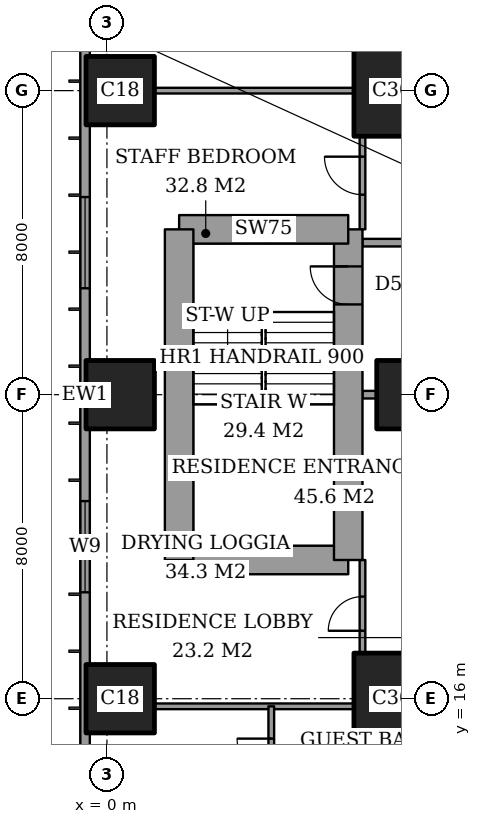
"""IFC4 building model, lengths in metres.
Left out: names, types, materials, properties, quantities, classifications, styles, units other than length and angle.
Written with IfcOpenShell. Run it as: python <this file> out.ifc"""

import sys

from ifc_helpers import new_model, si_unit, direction, frame, frame_2d, origin, origin_2d, place, context, subcontext, project, spatial, rectangle, extrude, element, fill, save


model = new_model("IFC4")
c1 = context("Model", 3, precision=1e-05, world=origin(), true_north=direction((0.0, 1.0)))
c2 = subcontext(c1, "Body", "Model", "MODEL_VIEW")
j1 = project(units=[si_unit("LENGTHUNIT", "METRE"), si_unit("PLANEANGLEUNIT", "RADIAN")], contexts=[c1])
p1 = place(None, origin())
s1 = spatial("IfcSite", under=j1, at=p1, CompositionType="ELEMENT")
p2 = place(p1, origin())
s2 = spatial("IfcBuilding", under=s1, at=p2, CompositionType="ELEMENT")
p3 = place(p2, frame((0.0, 0.0, 189.4)))
s3 = spatial("IfcBuildingStorey", under=s2, at=p3, CompositionType="ELEMENT", Elevation=189.4)
for number, where, z_axis, x_axis in (
    (1, (0.35, 16.0, 0.0), (0.0, 0.0, 1.0), (1.0, 0.0, 0.0)),
    (2, (0.35, 24.0, 0.0), (0.0, 0.0, 1.0), (1.0, 0.0, 0.0)),
    (3, (0.35, 32.0, 0.0), (0.0, 0.0, 1.0), (1.0, 0.0, 0.0)),
):
    element("IfcColumn", number, at=place(p3, frame(where, z_axis=z_axis, x_axis=x_axis)), inside=s3, PredefinedType="COLUMN", context=c2, shape_type="SweptSolid", body=[
        extrude(rectangle(XDim=1.8, YDim=1.8, at=origin_2d()), origin(), (0.0, 0.0, 1.0), 3.6),
    ])
p4 = place(p3, frame((8.0, 16.0, 0.0), z_axis=(0.0, 0.0, 1.0), x_axis=(1.0, 0.0, 0.0)))
e4 = element("IfcColumn", 4, at=p4, inside=s3, PredefinedType="COLUMN", context=c2, shape_type="SweptSolid", body=[
    extrude(rectangle(XDim=3.0, YDim=2.4, at=origin_2d()), origin(), (0.0, 0.0, 1.0), 3.6),
])
p5 = place(p3, frame((8.0, 24.0, 0.0), z_axis=(0.0, 0.0, 1.0), x_axis=(1.0, 0.0, 0.0)))
e5 = element("IfcColumn", 5, at=p5, inside=s3, PredefinedType="COLUMN", context=c2, shape_type="SweptSolid", body=[
    extrude(rectangle(XDim=1.8, YDim=1.8, at=origin_2d()), origin(), (0.0, 0.0, 1.0), 3.6),
])
p6 = place(p3, frame((8.0, 32.0, 0.0), z_axis=(0.0, 0.0, 1.0), x_axis=(1.0, 0.0, 0.0)))
e6 = element("IfcColumn", 6, at=p6, inside=s3, PredefinedType="COLUMN", context=c2, shape_type="SweptSolid", body=[
    extrude(rectangle(XDim=3.0, YDim=2.4, at=origin_2d()), origin(), (0.0, 0.0, 1.0), 3.6),
])
p7 = place(p3, frame((1.9, 19.65, 0.0), z_axis=(0.0, 0.0, 1.0), x_axis=(1.0, 0.0, 0.0)))
e7 = element("IfcWall", 7, at=p7, inside=s3, PredefinedType="SHEAR", context=c2, shape_type="SweptSolid", body=[
    extrude(rectangle(XDim=4.45, YDim=0.75, at=frame_2d((2.225, 0.0))), origin(), (0.0, 0.0, 1.0), 3.6),
])
p8 = place(p3, frame((6.35, 19.65, 0.0), z_axis=(0.0, 0.0, 1.0), x_axis=(0.0, 1.0, 0.0)))
e8 = element("IfcWall", 8, at=p8, inside=s3, PredefinedType="SHEAR", context=c2, shape_type="SweptSolid", body=[
    extrude(rectangle(XDim=8.7, YDim=0.75, at=frame_2d((4.35, 0.0))), origin(), (0.0, 0.0, 1.0), 3.6),
])
p9 = place(p8, frame((6.725, 0.0, 0.0)))
e9 = element("IfcOpeningElement", 9, at=p9, cuts=e8, PredefinedType="OPENING", context=c2, shape_type="SweptSolid", body=[
    extrude(rectangle(XDim=1.0, YDim=2.1, at=frame_2d((0.5, 1.05))), frame((0.0, 0.385, 0.0), z_axis=(0.0, -1.0, 0.0), x_axis=(1.0, 0.0, 0.0)), (0.0, 0.0, 1.0), 0.77),
])
p10 = place(p3, frame((6.35, 28.35, 0.0), z_axis=(0.0, 0.0, 1.0), x_axis=(-1.0, 0.0, 0.0)))
e10 = element("IfcWall", 10, at=p10, inside=s3, PredefinedType="SHEAR", context=c2, shape_type="SweptSolid", body=[
    extrude(rectangle(XDim=4.45, YDim=0.75, at=frame_2d((2.225, 0.0))), origin(), (0.0, 0.0, 1.0), 3.6),
])
p11 = place(p3, frame((1.9, 28.35, 0.0), z_axis=(0.0, 0.0, 1.0), x_axis=(0.0, -1.0, 0.0)))
e11 = element("IfcWall", 11, at=p11, inside=s3, PredefinedType="SHEAR", context=c2, shape_type="SweptSolid", body=[
    extrude(rectangle(XDim=8.7, YDim=0.75, at=frame_2d((4.35, 0.0))), origin(), (0.0, 0.0, 1.0), 3.6),
])
p12 = place(p3, frame((-0.575, 44.825, 0.0), z_axis=(0.0, 0.0, 1.0), x_axis=(0.0, -1.0, 0.0)))
e12 = element("IfcWall", 12, at=p12, inside=s3, PredefinedType="SOLIDWALL", context=c2, shape_type="SweptSolid", body=[
    extrude(rectangle(XDim=41.65, YDim=0.25, at=frame_2d((20.825, 0.0))), origin(), (0.0, 0.0, 1.0), 3.6),
])
p13 = place(p12, frame((0.825, 0.0, 0.2)))
e13 = element("IfcOpeningElement", 13, at=p13, cuts=e12, PredefinedType="OPENING", context=c2, shape_type="SweptSolid", body=[
    extrude(rectangle(XDim=2.4, YDim=2.4, at=frame_2d((1.2, 1.2))), frame((0.0, 0.135, 0.0), z_axis=(0.0, -1.0, 0.0), x_axis=(1.0, 0.0, 0.0)), (0.0, 0.0, 1.0), 0.27),
])
p14 = place(p12, frame((6.05, 0.0, 0.2)))
e14 = element("IfcOpeningElement", 14, at=p14, cuts=e12, PredefinedType="OPENING", context=c2, shape_type="SweptSolid", body=[
    extrude(rectangle(XDim=1.2, YDim=2.4, at=frame_2d((0.6, 1.2))), frame((0.0, 0.135, 0.0), z_axis=(0.0, -1.0, 0.0), x_axis=(1.0, 0.0, 0.0)), (0.0, 0.0, 1.0), 0.27),
])
p15 = place(p12, frame((8.475, 0.0, 0.2)))
e15 = element("IfcOpeningElement", 15, at=p15, cuts=e12, PredefinedType="OPENING", context=c2, shape_type="SweptSolid", body=[
    extrude(rectangle(XDim=2.4, YDim=2.4, at=frame_2d((1.2, 1.2))), frame((0.0, 0.135, 0.0), z_axis=(0.0, -1.0, 0.0), x_axis=(1.0, 0.0, 0.0)), (0.0, 0.0, 1.0), 0.27),
])
p16 = place(p12, frame((15.625, 0.0, 0.2)))
e16 = element("IfcOpeningElement", 16, at=p16, cuts=e12, PredefinedType="OPENING", context=c2, shape_type="SweptSolid", body=[
    extrude(rectangle(XDim=2.4, YDim=2.4, at=frame_2d((1.2, 1.2))), frame((0.0, 0.135, 0.0), z_axis=(0.0, -1.0, 0.0), x_axis=(1.0, 0.0, 0.0)), (0.0, 0.0, 1.0), 0.27),
])
p17 = place(p12, frame((23.625, 0.0, 0.2)))
e17 = element("IfcOpeningElement", 17, at=p17, cuts=e12, PredefinedType="OPENING", context=c2, shape_type="SweptSolid", body=[
    extrude(rectangle(XDim=2.4, YDim=2.4, at=frame_2d((1.2, 1.2))), frame((0.0, 0.135, 0.0), z_axis=(0.0, -1.0, 0.0), x_axis=(1.0, 0.0, 0.0)), (0.0, 0.0, 1.0), 0.27),
])
p18 = place(p12, frame((30.775, 0.0, 0.2)))
e18 = element("IfcOpeningElement", 18, at=p18, cuts=e12, PredefinedType="OPENING", context=c2, shape_type="SweptSolid", body=[
    extrude(rectangle(XDim=2.4, YDim=2.4, at=frame_2d((1.2, 1.2))), frame((0.0, 0.135, 0.0), z_axis=(0.0, -1.0, 0.0), x_axis=(1.0, 0.0, 0.0)), (0.0, 0.0, 1.0), 0.27),
])
p19 = place(p12, frame((34.55, 0.0, 0.2)))
e19 = element("IfcOpeningElement", 19, at=p19, cuts=e12, PredefinedType="OPENING", context=c2, shape_type="SweptSolid", body=[
    extrude(rectangle(XDim=1.2, YDim=2.4, at=frame_2d((0.6, 1.2))), frame((0.0, 0.135, 0.0), z_axis=(0.0, -1.0, 0.0), x_axis=(1.0, 0.0, 0.0)), (0.0, 0.0, 1.0), 0.27),
])
p20 = place(p12, frame((38.425, 0.0, 0.2)))
e20 = element("IfcOpeningElement", 20, at=p20, cuts=e12, PredefinedType="OPENING", context=c2, shape_type="SweptSolid", body=[
    extrude(rectangle(XDim=2.4, YDim=2.4, at=frame_2d((1.2, 1.2))), frame((0.0, 0.135, 0.0), z_axis=(0.0, -1.0, 0.0), x_axis=(1.0, 0.0, 0.0)), (0.0, 0.0, 1.0), 0.27),
])
p21 = place(p3, frame((1.25, 15.8, 0.0), z_axis=(0.0, 0.0, 1.0), x_axis=(1.0, 0.0, 0.0)))
e21 = element("IfcWall", 21, at=p21, inside=s3, PredefinedType="PARTITIONING", context=c2, shape_type="SweptSolid", body=[
    extrude(rectangle(XDim=5.25, YDim=0.15, at=frame_2d((2.625, 0.0))), origin(), (0.0, 0.0, 1.0), 3.35),
])
p22 = place(p3, frame((6.725, 24.0, 0.0), z_axis=(0.0, 0.0, 1.0), x_axis=(1.0, 0.0, 0.0)))
e22 = element("IfcWall", 22, at=p22, inside=s3, PredefinedType="PARTITIONING", context=c2, shape_type="SweptSolid", body=[
    extrude(rectangle(XDim=0.375, YDim=0.2, at=frame_2d((0.188, 0.0))), origin(), (0.0, 0.0, 1.0), 3.35),
])
p23 = place(p3, frame((6.725, 28.0, 0.0), z_axis=(0.0, 0.0, 1.0), x_axis=(1.0, 0.0, 0.0)))
e23 = element("IfcWall", 23, at=p23, inside=s3, PredefinedType="PARTITIONING", context=c2, shape_type="SweptSolid", body=[
    extrude(rectangle(XDim=17.275, YDim=0.2, at=frame_2d((8.637, 0.0))), origin(), (0.0, 0.0, 1.0), 3.35),
])
p24 = place(p23, frame((6.675, 0.0, 0.0)))
e24 = element("IfcOpeningElement", 24, at=p24, cuts=e23, PredefinedType="OPENING", context=c2, shape_type="SweptSolid", body=[
    extrude(rectangle(XDim=1.2, YDim=2.4, at=frame_2d((0.6, 1.2))), frame((0.0, 0.11, 0.0), z_axis=(0.0, -1.0, 0.0), x_axis=(1.0, 0.0, 0.0)), (0.0, 0.0, 1.0), 0.22),
])
p25 = place(p3, frame((1.25, 32.0, 0.0), z_axis=(0.0, 0.0, 1.0), x_axis=(1.0, 0.0, 0.0)))
e25 = element("IfcWall", 25, at=p25, inside=s3, PredefinedType="PARTITIONING", context=c2, shape_type="SweptSolid", body=[
    extrude(rectangle(XDim=5.25, YDim=0.15, at=frame_2d((2.625, 0.0))), origin(), (0.0, 0.0, 1.0), 2.634),
])
p26 = place(p3, frame((4.325, 13.2, 0.0), z_axis=(0.0, 0.0, 1.0), x_axis=(0.0, 1.0, 0.0)))
e26 = element("IfcWall", 26, at=p26, inside=s3, PredefinedType="PARTITIONING", context=c2, shape_type="SweptSolid", body=[
    extrude(rectangle(XDim=2.6, YDim=0.15, at=frame_2d((1.3, 0.0))), origin(), (0.0, 0.0, 1.0), 3.35),
])
p27 = place(p26, frame((0.85, 0.0, 0.0)))
e27 = element("IfcOpeningElement", 27, at=p27, cuts=e26, PredefinedType="OPENING", context=c2, shape_type="SweptSolid", body=[
    extrude(rectangle(XDim=0.9, YDim=2.1, at=frame_2d((0.45, 1.05))), frame((0.0, 0.085, 0.0), z_axis=(0.0, -1.0, 0.0), x_axis=(1.0, 0.0, 0.0)), (0.0, 0.0, 1.0), 0.17),
])
p28 = place(p3, frame((6.725, 10.6, 0.0), z_axis=(0.0, 0.0, 1.0), x_axis=(0.0, 1.0, 0.0)))
e28 = element("IfcWall", 28, at=p28, inside=s3, PredefinedType="PARTITIONING", context=c2, shape_type="SweptSolid", body=[
    extrude(rectangle(XDim=4.2, YDim=0.15, at=frame_2d((2.1, 0.0))), origin(), (0.0, 0.0, 1.0), 3.35),
])
p29 = place(p3, frame((6.725, 17.2, 0.0), z_axis=(0.0, 0.0, 1.0), x_axis=(0.0, 1.0, 0.0)))
e29 = element("IfcWall", 29, at=p29, inside=s3, PredefinedType="PARTITIONING", context=c2, shape_type="SweptSolid", body=[
    extrude(rectangle(XDim=2.45, YDim=0.15, at=frame_2d((1.225, 0.0))), origin(), (0.0, 0.0, 1.0), 3.35),
])
p30 = place(p29, frame((0.587, 0.0, 0.0)))
e30 = element("IfcOpeningElement", 30, at=p30, cuts=e29, PredefinedType="OPENING", context=c2, shape_type="SweptSolid", body=[
    extrude(rectangle(XDim=0.9, YDim=2.1, at=frame_2d((0.45, 1.05))), frame((0.0, 0.085, 0.0), z_axis=(0.0, -1.0, 0.0), x_axis=(1.0, 0.0, 0.0)), (0.0, 0.0, 1.0), 0.17),
])
p31 = place(p3, frame((6.725, 28.35, 0.0), z_axis=(0.0, 0.0, 1.0), x_axis=(0.0, 1.0, 0.0)))
e31 = element("IfcWall", 31, at=p31, inside=s3, PredefinedType="PARTITIONING", context=c2, shape_type="SweptSolid", body=[
    extrude(rectangle(XDim=2.45, YDim=0.15, at=frame_2d((1.225, 0.0))), origin(), (0.0, 0.0, 1.0), 3.35),
])
p32 = place(p31, frame((0.913, 0.0, 0.0)))
e32 = element("IfcOpeningElement", 32, at=p32, cuts=e31, PredefinedType="OPENING", context=c2, shape_type="SweptSolid", body=[
    extrude(rectangle(XDim=1.0, YDim=2.1, at=frame_2d((0.5, 1.05))), frame((0.0, 0.085, 0.0), z_axis=(0.0, -1.0, 0.0), x_axis=(1.0, 0.0, 0.0)), (0.0, 0.0, 1.0), 0.17),
])
p33 = place(p16, origin())
e33 = element("IfcWindow", 33, at=p33, inside=s3, PartitioningType="SINGLE_PANEL", PredefinedType="WINDOW", context=c2, shape_type="SweptSolid", body=[
    extrude(rectangle(XDim=2.4, YDim=2.4, at=frame_2d((1.2, 1.2))), frame((0.0, 0.03, 0.0), z_axis=(0.0, -1.0, 0.0), x_axis=(1.0, 0.0, 0.0)), (0.0, 0.0, 1.0), 0.06),
])
fill(e16, e33)
p34 = place(p17, origin())
e34 = element("IfcWindow", 34, at=p34, inside=s3, PartitioningType="SINGLE_PANEL", PredefinedType="WINDOW", context=c2, shape_type="SweptSolid", body=[
    extrude(rectangle(XDim=2.4, YDim=2.4, at=frame_2d((1.2, 1.2))), frame((0.0, 0.03, 0.0), z_axis=(0.0, -1.0, 0.0), x_axis=(1.0, 0.0, 0.0)), (0.0, 0.0, 1.0), 0.06),
])
fill(e17, e34)
p35 = place(p27, origin())
e35 = element("IfcDoor", 35, at=p35, inside=s3, OperationType="SINGLE_SWING_LEFT", PredefinedType="DOOR", context=c2, shape_type="SweptSolid", body=[
    extrude(rectangle(XDim=0.9, YDim=2.1, at=frame_2d((0.45, 1.05))), frame((0.0, 0.025, 0.0), z_axis=(0.0, -1.0, 0.0), x_axis=(1.0, 0.0, 0.0)), (0.0, 0.0, 1.0), 0.05),
])
fill(e27, e35)
p36 = place(p30, origin())
e36 = element("IfcDoor", 36, at=p36, inside=s3, OperationType="SINGLE_SWING_RIGHT", PredefinedType="DOOR", context=c2, shape_type="SweptSolid", body=[
    extrude(rectangle(XDim=0.9, YDim=2.1, at=frame_2d((0.45, 1.05))), frame((0.0, 0.025, 0.0), z_axis=(0.0, -1.0, 0.0), x_axis=(1.0, 0.0, 0.0)), (0.0, 0.0, 1.0), 0.05),
])
fill(e30, e36)
p37 = place(p32, origin())
e37 = element("IfcDoor", 37, at=p37, inside=s3, OperationType="SINGLE_SWING_LEFT", PredefinedType="DOOR", context=c2, shape_type="SweptSolid", body=[
    extrude(rectangle(XDim=1.0, YDim=2.1, at=frame_2d((0.5, 1.05))), frame((0.0, 0.025, 0.0), z_axis=(0.0, -1.0, 0.0), x_axis=(1.0, 0.0, 0.0)), (0.0, 0.0, 1.0), 0.05),
])
fill(e32, e37)
p38 = place(p9, origin())
e38 = element("IfcDoor", 38, at=p38, inside=s3, OperationType="SINGLE_SWING_LEFT", PredefinedType="DOOR", context=c2, shape_type="SweptSolid", body=[
    extrude(rectangle(XDim=1.0, YDim=2.1, at=frame_2d((0.5, 1.05))), frame((0.0, 0.025, 0.0), z_axis=(0.0, -1.0, 0.0), x_axis=(1.0, 0.0, 0.0)), (0.0, 0.0, 1.0), 0.05),
])
fill(e9, e38)
save(model, sys.argv[1])
